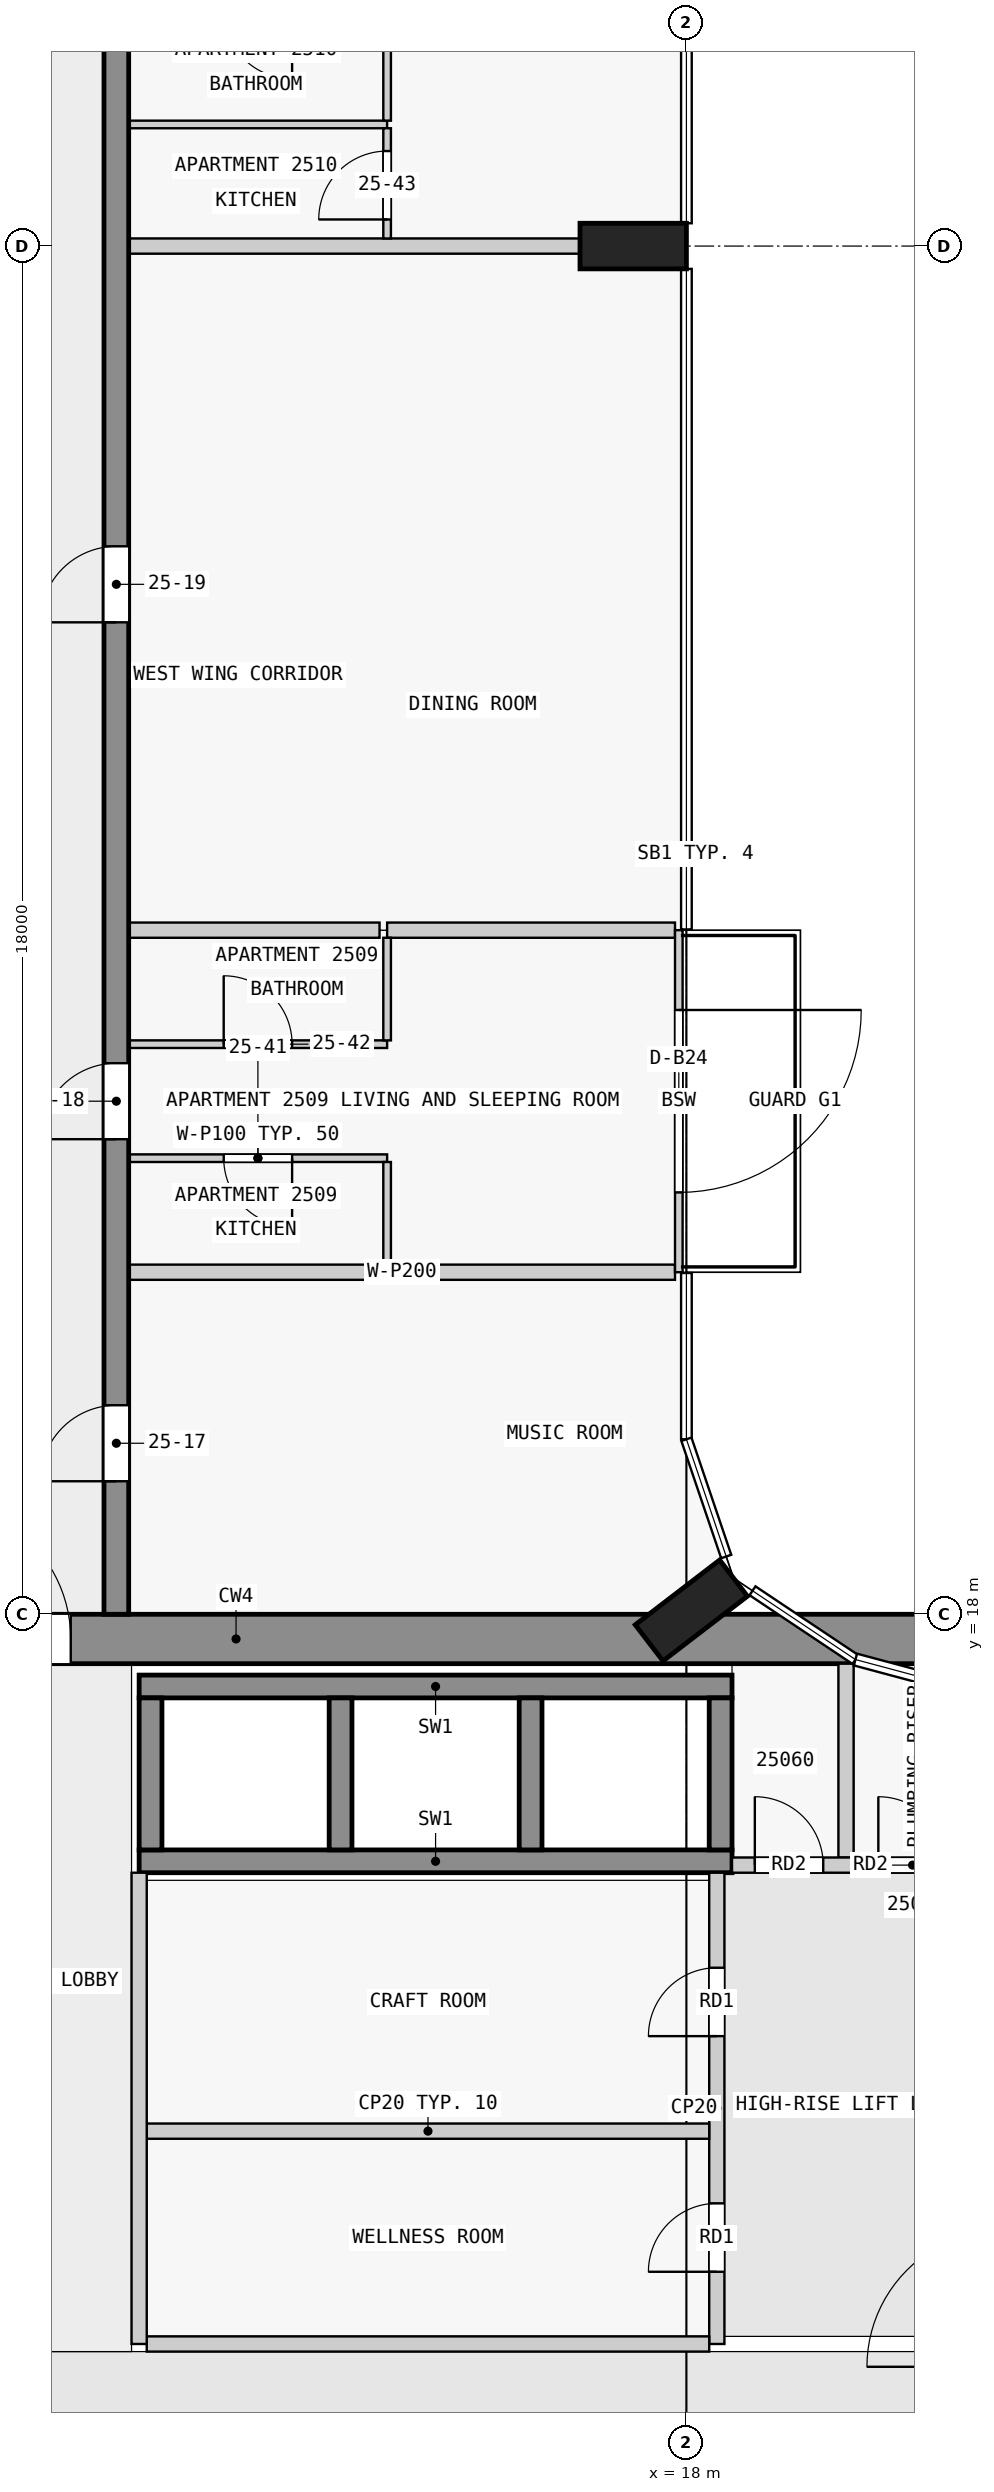
"""IFC4 building model, lengths in metres.
Left out: names, types, materials, properties, quantities, classifications, styles, units other than length and angle.
Written with IfcOpenShell. Run it as: python <this file> out.ifc"""

import sys

from ifc_helpers import new_model, si_unit, direction, frame, frame_2d, origin, origin_2d, place, context, subcontext, project, spatial, rectangle, extrude, element, fill, save


model = new_model("IFC4")
c1 = context("Model", 3, precision=1e-05, world=origin(), true_north=direction((0.0, 1.0)))
c2 = subcontext(c1, "Body", "Model", "MODEL_VIEW")
j1 = project(units=[si_unit("LENGTHUNIT", "METRE"), si_unit("PLANEANGLEUNIT", "RADIAN")], contexts=[c1])
p1 = place(None, origin())
s1 = spatial("IfcSite", under=j1, at=p1, CompositionType="ELEMENT")
p2 = place(p1, origin())
s2 = spatial("IfcBuilding", under=s1, at=p2, CompositionType="ELEMENT")
p3 = place(p2, frame((0.0, 0.0, 99.3)))
s3 = spatial("IfcBuildingStorey", under=s2, at=p3, CompositionType="ELEMENT", Elevation=99.3)
for number, where, z_axis, x_axis in (
    (1, (18.065, 18.05, 0.0), (0.0, 0.0, 1.0), (-0.609, 0.793, 0.0)),
    (2, (17.3, 36.0, 0.0), (0.0, 0.0, 1.0), (0.0, 1.0, 0.0)),
):
    element("IfcColumn", number, at=place(p3, frame(where, z_axis=z_axis, x_axis=x_axis)), inside=s3, PredefinedType="COLUMN", context=c2, shape_type="SweptSolid", body=[
        extrude(rectangle(XDim=0.6, YDim=1.4, at=origin_2d()), origin(), (0.0, 0.0, 1.0), 3.5),
    ])
p4 = place(p3, frame((1.65, 17.675, 0.0), z_axis=(0.0, 0.0, 1.0), x_axis=(1.0, 0.0, 0.0)))
e3 = element("IfcWall", 3, at=p4, inside=s3, PredefinedType="SHEAR", context=c2, shape_type="SweptSolid", body=[
    extrude(rectangle(XDim=20.85, YDim=0.65, at=frame_2d((10.425, 0.0))), origin(), (0.0, 0.0, 1.0), 3.25),
])
p5 = place(p4, frame((6.45, 0.0, 0.0)))
e4 = element("IfcOpeningElement", 4, at=p5, cuts=e3, PredefinedType="OPENING", context=c2, shape_type="SweptSolid", body=[
    extrude(rectangle(XDim=1.8, YDim=2.1, at=frame_2d((0.9, 1.05))), frame((0.0, 0.335, 0.0), z_axis=(0.0, -1.0, 0.0), x_axis=(1.0, 0.0, 0.0)), (0.0, 0.0, 1.0), 0.67),
])
for number, where, z_axis, x_axis in (
    (5, (10.8, 17.05, 0.0), (0.0, 0.0, 1.0), (1.0, 0.0, 0.0)),
    (6, (10.8, 14.75, 0.0), (0.0, 0.0, 1.0), (1.0, 0.0, 0.0)),
):
    element("IfcWall", number, at=place(p3, frame(where, z_axis=z_axis, x_axis=x_axis)), inside=s3, PredefinedType="SHEAR", context=c2, shape_type="SweptSolid", body=[
        extrude(rectangle(XDim=7.8, YDim=0.3, at=frame_2d((3.9, 0.0))), origin(), (0.0, 0.0, 1.0), 3.25),
    ])
for number, where, z_axis, x_axis in (
    (7, (10.95, 14.9, 0.0), (0.0, 0.0, 1.0), (0.0, 1.0, 0.0)),
    (8, (13.45, 14.9, 0.0), (0.0, 0.0, 1.0), (0.0, 1.0, 0.0)),
    (9, (15.95, 14.9, 0.0), (0.0, 0.0, 1.0), (0.0, 1.0, 0.0)),
    (10, (18.45, 14.9, 0.0), (0.0, 0.0, 1.0), (0.0, 1.0, 0.0)),
):
    element("IfcWall", number, at=place(p3, frame(where, z_axis=z_axis, x_axis=x_axis)), inside=s3, PredefinedType="SHEAR", context=c2, shape_type="SweptSolid", body=[
        extrude(rectangle(XDim=2.0, YDim=0.3, at=frame_2d((1.0, 0.0))), origin(), (0.0, 0.0, 1.0), 3.25),
    ])
p6 = place(p3, frame((10.5, 18.0, 0.0), z_axis=(0.0, 0.0, 1.0), x_axis=(0.0, 1.0, 0.0)))
e11 = element("IfcWall", 11, at=p6, inside=s3, PredefinedType="SHEAR", context=c2, shape_type="SweptSolid", body=[
    extrude(rectangle(XDim=27.0, YDim=0.325, at=frame_2d((13.5, 0.0))), origin(), (0.0, 0.0, 1.0), 3.25),
])
p7 = place(p6, frame((1.75, 0.0, 0.0)))
e12 = element("IfcOpeningElement", 12, at=p7, cuts=e11, PredefinedType="OPENING", context=c2, shape_type="SweptSolid", body=[
    extrude(rectangle(XDim=1.0, YDim=2.1, at=frame_2d((0.5, 1.05))), frame((0.0, 0.172, 0.0), z_axis=(0.0, -1.0, 0.0), x_axis=(1.0, 0.0, 0.0)), (0.0, 0.0, 1.0), 0.345),
])
p8 = place(p6, frame((6.25, 0.0, 0.0)))
e13 = element("IfcOpeningElement", 13, at=p8, cuts=e11, PredefinedType="OPENING", context=c2, shape_type="SweptSolid", body=[
    extrude(rectangle(XDim=1.0, YDim=2.1, at=frame_2d((0.5, 1.05))), frame((0.0, 0.172, 0.0), z_axis=(0.0, -1.0, 0.0), x_axis=(1.0, 0.0, 0.0)), (0.0, 0.0, 1.0), 0.345),
])
p9 = place(p6, frame((13.05, 0.0, 0.0)))
e14 = element("IfcOpeningElement", 14, at=p9, cuts=e11, PredefinedType="OPENING", context=c2, shape_type="SweptSolid", body=[
    extrude(rectangle(XDim=1.0, YDim=2.1, at=frame_2d((0.5, 1.05))), frame((0.0, 0.172, 0.0), z_axis=(0.0, -1.0, 0.0), x_axis=(1.0, 0.0, 0.0)), (0.0, 0.0, 1.0), 0.345),
])
p10 = place(p6, frame((21.35, 0.0, 0.0)))
e15 = element("IfcOpeningElement", 15, at=p10, cuts=e11, PredefinedType="OPENING", context=c2, shape_type="SweptSolid", body=[
    extrude(rectangle(XDim=1.0, YDim=2.1, at=frame_2d((0.5, 1.05))), frame((0.0, 0.172, 0.0), z_axis=(0.0, -1.0, 0.0), x_axis=(1.0, 0.0, 0.0)), (0.0, 0.0, 1.0), 0.345),
])
p11 = place(p3, frame((17.9, 27.0, 0.0), z_axis=(0.0, 0.0, 1.0), x_axis=(0.0, -1.0, 0.0)))
e16 = element("IfcWall", 16, at=p11, inside=s3, PredefinedType="STANDARD", context=c2, shape_type="SweptSolid", body=[
    extrude(rectangle(XDim=4.5, YDim=0.1, at=frame_2d((2.25, 0.0))), origin(), (0.0, 0.0, 1.0), 3.25),
])
p12 = place(p11, frame((1.05, 0.0, 0.0)))
e17 = element("IfcOpeningElement", 17, at=p12, cuts=e16, PredefinedType="OPENING", context=c2, shape_type="SweptSolid", body=[
    extrude(rectangle(XDim=2.4, YDim=2.4, at=frame_2d((1.2, 1.2))), frame((0.0, 0.06, 0.0), z_axis=(0.0, -1.0, 0.0), x_axis=(1.0, 0.0, 0.0)), (0.0, 0.0, 1.0), 0.12),
])
p13 = place(p3, frame((10.8, 8.4, 0.0), z_axis=(0.0, 0.0, 1.0), x_axis=(0.0, 1.0, 0.0)))
e18 = element("IfcWall", 18, at=p13, inside=s3, PredefinedType="PARTITIONING", context=c2, shape_type="SweptSolid", body=[
    extrude(rectangle(XDim=6.2, YDim=0.2, at=frame_2d((3.1, 0.0))), origin(), (0.0, 0.0, 1.0), 3.25),
])
p14 = place(p3, frame((10.9, 8.4, 0.0), z_axis=(0.0, 0.0, 1.0), x_axis=(1.0, 0.0, 0.0)))
e19 = element("IfcWall", 19, at=p14, inside=s3, PredefinedType="PARTITIONING", context=c2, shape_type="SweptSolid", body=[
    extrude(rectangle(XDim=7.4, YDim=0.2, at=frame_2d((3.7, 0.0))), origin(), (0.0, 0.0, 1.0), 3.25),
])
p15 = place(p3, frame((18.4, 8.4, 0.0), z_axis=(0.0, 0.0, 1.0), x_axis=(0.0, 1.0, 0.0)))
e20 = element("IfcWall", 20, at=p15, inside=s3, PredefinedType="PARTITIONING", context=c2, shape_type="SweptSolid", body=[
    extrude(rectangle(XDim=6.2, YDim=0.2, at=frame_2d((3.1, 0.0))), origin(), (0.0, 0.0, 1.0), 3.25),
])
p16 = place(p15, frame((0.95, 0.0, 0.0)))
e21 = element("IfcOpeningElement", 21, at=p16, cuts=e20, PredefinedType="OPENING", context=c2, shape_type="SweptSolid", body=[
    extrude(rectangle(XDim=0.9, YDim=2.1, at=frame_2d((0.45, 1.05))), frame((0.0, 0.11, 0.0), z_axis=(0.0, -1.0, 0.0), x_axis=(1.0, 0.0, 0.0)), (0.0, 0.0, 1.0), 0.22),
])
p17 = place(p15, frame((4.05, 0.0, 0.0)))
e22 = element("IfcOpeningElement", 22, at=p17, cuts=e20, PredefinedType="OPENING", context=c2, shape_type="SweptSolid", body=[
    extrude(rectangle(XDim=0.9, YDim=2.1, at=frame_2d((0.45, 1.05))), frame((0.0, 0.11, 0.0), z_axis=(0.0, -1.0, 0.0), x_axis=(1.0, 0.0, 0.0)), (0.0, 0.0, 1.0), 0.22),
])
p18 = place(p3, frame((10.9, 11.2, 0.0), z_axis=(0.0, 0.0, 1.0), x_axis=(1.0, 0.0, 0.0)))
e23 = element("IfcWall", 23, at=p18, inside=s3, PredefinedType="PARTITIONING", context=c2, shape_type="SweptSolid", body=[
    extrude(rectangle(XDim=7.4, YDim=0.2, at=frame_2d((3.7, 0.0))), origin(), (0.0, 0.0, 1.0), 3.25),
])
p19 = place(p3, frame((18.6, 14.7, 0.0), z_axis=(0.0, 0.0, 1.0), x_axis=(1.0, 0.0, 0.0)))
e24 = element("IfcWall", 24, at=p19, inside=s3, PredefinedType="PARTITIONING", context=c2, shape_type="SweptSolid", body=[
    extrude(rectangle(XDim=3.25, YDim=0.2, at=frame_2d((1.625, 0.0))), origin(), (0.0, 0.0, 1.0), 3.25),
])
p20 = place(p19, frame((0.3, 0.0, 0.0)))
e25 = element("IfcOpeningElement", 25, at=p20, cuts=e24, PredefinedType="OPENING", context=c2, shape_type="SweptSolid", body=[
    extrude(rectangle(XDim=0.9, YDim=2.1, at=frame_2d((0.45, 1.05))), frame((0.0, 0.11, 0.0), z_axis=(0.0, -1.0, 0.0), x_axis=(1.0, 0.0, 0.0)), (0.0, 0.0, 1.0), 0.22),
])
p21 = place(p19, frame((1.925, 0.0, 0.0)))
e26 = element("IfcOpeningElement", 26, at=p21, cuts=e24, PredefinedType="OPENING", context=c2, shape_type="SweptSolid", body=[
    extrude(rectangle(XDim=0.9, YDim=2.1, at=frame_2d((0.45, 1.05))), frame((0.0, 0.11, 0.0), z_axis=(0.0, -1.0, 0.0), x_axis=(1.0, 0.0, 0.0)), (0.0, 0.0, 1.0), 0.22),
])
p22 = place(p3, frame((20.1, 14.8, 0.0), z_axis=(0.0, 0.0, 1.0), x_axis=(0.0, 1.0, 0.0)))
e27 = element("IfcWall", 27, at=p22, inside=s3, PredefinedType="PARTITIONING", context=c2, shape_type="SweptSolid", body=[
    extrude(rectangle(XDim=2.55, YDim=0.2, at=frame_2d((1.275, 0.0))), origin(), (0.0, 0.0, 1.0), 3.25),
])
p23 = place(p3, frame((17.85, 22.5, 0.0), z_axis=(0.0, 0.0, 1.0), x_axis=(-1.0, 0.0, 0.0)))
e28 = element("IfcWall", 28, at=p23, inside=s3, PredefinedType="PARTITIONING", context=c2, shape_type="SweptSolid", body=[
    extrude(rectangle(XDim=7.188, YDim=0.2, at=frame_2d((3.594, 0.0))), origin(), (0.0, 0.0, 1.0), 3.25),
])
p24 = place(p3, frame((14.062, 24.0, 0.0), z_axis=(0.0, 0.0, 1.0), x_axis=(-1.0, 0.0, 0.0)))
e29 = element("IfcWall", 29, at=p24, inside=s3, PredefinedType="PARTITIONING", context=c2, shape_type="SweptSolid", body=[
    extrude(rectangle(XDim=3.4, YDim=0.1, at=frame_2d((1.7, 0.0))), origin(), (0.0, 0.0, 1.0), 3.25),
])
p25 = place(p24, frame((1.25, 0.0, 0.0)))
e30 = element("IfcOpeningElement", 30, at=p25, cuts=e29, PredefinedType="OPENING", context=c2, shape_type="SweptSolid", body=[
    extrude(rectangle(XDim=0.9, YDim=2.1, at=frame_2d((0.45, 1.05))), frame((0.0, 0.06, 0.0), z_axis=(0.0, -1.0, 0.0), x_axis=(1.0, 0.0, 0.0)), (0.0, 0.0, 1.0), 0.12),
])
p26 = place(p3, frame((10.663, 25.5, 0.0), z_axis=(0.0, 0.0, 1.0), x_axis=(1.0, 0.0, 0.0)))
e31 = element("IfcWall", 31, at=p26, inside=s3, PredefinedType="PARTITIONING", context=c2, shape_type="SweptSolid", body=[
    extrude(rectangle(XDim=3.4, YDim=0.1, at=frame_2d((1.7, 0.0))), origin(), (0.0, 0.0, 1.0), 3.25),
])
p27 = place(p26, frame((1.25, 0.0, 0.0)))
e32 = element("IfcOpeningElement", 32, at=p27, cuts=e31, PredefinedType="OPENING", context=c2, shape_type="SweptSolid", body=[
    extrude(rectangle(XDim=0.9, YDim=2.1, at=frame_2d((0.45, 1.05))), frame((0.0, 0.06, 0.0), z_axis=(0.0, -1.0, 0.0), x_axis=(1.0, 0.0, 0.0)), (0.0, 0.0, 1.0), 0.12),
])
p28 = place(p3, frame((13.962, 27.0, 0.0), z_axis=(0.0, 0.0, 1.0), x_axis=(-1.0, 0.0, 0.0)))
e33 = element("IfcWall", 33, at=p28, inside=s3, PredefinedType="PARTITIONING", context=c2, shape_type="SweptSolid", body=[
    extrude(rectangle(XDim=3.3, YDim=0.2, at=frame_2d((1.65, 0.0))), origin(), (0.0, 0.0, 1.0), 3.25),
])
p29 = place(p3, frame((14.062, 27.0, 0.0), z_axis=(0.0, 0.0, 1.0), x_axis=(1.0, 0.0, 0.0)))
e34 = element("IfcWall", 34, at=p29, inside=s3, PredefinedType="PARTITIONING", context=c2, shape_type="SweptSolid", body=[
    extrude(rectangle(XDim=3.788, YDim=0.2, at=frame_2d((1.894, 0.0))), origin(), (0.0, 0.0, 1.0), 3.25),
])
p30 = place(p3, frame((16.6, 36.0, 0.0), z_axis=(0.0, 0.0, 1.0), x_axis=(-1.0, 0.0, 0.0)))
e35 = element("IfcWall", 35, at=p30, inside=s3, PredefinedType="PARTITIONING", context=c2, shape_type="SweptSolid", body=[
    extrude(rectangle(XDim=5.938, YDim=0.2, at=frame_2d((2.969, 0.0))), origin(), (0.0, 0.0, 1.0), 3.25),
])
p31 = place(p3, frame((14.062, 37.6, 0.0), z_axis=(0.0, 0.0, 1.0), x_axis=(-1.0, 0.0, 0.0)))
e36 = element("IfcWall", 36, at=p31, inside=s3, PredefinedType="PARTITIONING", context=c2, shape_type="SweptSolid", body=[
    extrude(rectangle(XDim=3.4, YDim=0.1, at=frame_2d((1.7, 0.0))), origin(), (0.0, 0.0, 1.0), 3.25),
])
for number, where, z_axis, x_axis in (
    (37, (14.062, 22.6, 0.0), (0.0, 0.0, 1.0), (0.0, 1.0, 0.0)),
    (38, (14.062, 25.55, 0.0), (0.0, 0.0, 1.0), (0.0, 1.0, 0.0)),
):
    element("IfcWall", number, at=place(p3, frame(where, z_axis=z_axis, x_axis=x_axis)), inside=s3, PredefinedType="PARTITIONING", context=c2, shape_type="SweptSolid", body=[
        extrude(rectangle(XDim=1.35, YDim=0.1, at=frame_2d((0.675, 0.0))), origin(), (0.0, 0.0, 1.0), 3.25),
    ])
p32 = place(p3, frame((14.062, 36.1, 0.0), z_axis=(0.0, 0.0, 1.0), x_axis=(0.0, 1.0, 0.0)))
e39 = element("IfcWall", 39, at=p32, inside=s3, PredefinedType="PARTITIONING", context=c2, shape_type="SweptSolid", body=[
    extrude(rectangle(XDim=1.45, YDim=0.1, at=frame_2d((0.725, 0.0))), origin(), (0.0, 0.0, 1.0), 3.25),
])
p33 = place(p32, frame((0.25, 0.0, 0.0)))
e40 = element("IfcOpeningElement", 40, at=p33, cuts=e39, PredefinedType="OPENING", context=c2, shape_type="SweptSolid", body=[
    extrude(rectangle(XDim=0.9, YDim=2.1, at=frame_2d((0.45, 1.05))), frame((0.0, 0.06, 0.0), z_axis=(0.0, -1.0, 0.0), x_axis=(1.0, 0.0, 0.0)), (0.0, 0.0, 1.0), 0.12),
])
p34 = place(p3, frame((14.062, 37.65, 0.0), z_axis=(0.0, 0.0, 1.0), x_axis=(0.0, 1.0, 0.0)))
e41 = element("IfcWall", 41, at=p34, inside=s3, PredefinedType="PARTITIONING", context=c2, shape_type="SweptSolid", body=[
    extrude(rectangle(XDim=1.4, YDim=0.1, at=frame_2d((0.7, 0.0))), origin(), (0.0, 0.0, 1.0), 3.25),
])
p35 = place(p12, origin())
e42 = element("IfcDoor", 42, at=p35, inside=s3, OperationType="SINGLE_SWING_LEFT", PredefinedType="DOOR", context=c2, shape_type="SweptSolid", body=[
    extrude(rectangle(XDim=2.4, YDim=2.4, at=frame_2d((1.2, 1.2))), frame((0.0, 0.025, 0.0), z_axis=(0.0, -1.0, 0.0), x_axis=(1.0, 0.0, 0.0)), (0.0, 0.0, 1.0), 0.05),
])
fill(e17, e42)
p36 = place(p16, origin())
e43 = element("IfcDoor", 43, at=p36, inside=s3, OperationType="SINGLE_SWING_LEFT", PredefinedType="DOOR", context=c2, shape_type="SweptSolid", body=[
    extrude(rectangle(XDim=0.9, YDim=2.1, at=frame_2d((0.45, 1.05))), frame((0.0, 0.025, 0.0), z_axis=(0.0, -1.0, 0.0), x_axis=(1.0, 0.0, 0.0)), (0.0, 0.0, 1.0), 0.05),
])
fill(e21, e43)
p37 = place(p17, origin())
e44 = element("IfcDoor", 44, at=p37, inside=s3, OperationType="SINGLE_SWING_LEFT", PredefinedType="DOOR", context=c2, shape_type="SweptSolid", body=[
    extrude(rectangle(XDim=0.9, YDim=2.1, at=frame_2d((0.45, 1.05))), frame((0.0, 0.025, 0.0), z_axis=(0.0, -1.0, 0.0), x_axis=(1.0, 0.0, 0.0)), (0.0, 0.0, 1.0), 0.05),
])
fill(e22, e44)
p38 = place(p5, origin())
e45 = element("IfcDoor", 45, at=p38, inside=s3, OperationType="DOUBLE_DOOR_SINGLE_SWING", PredefinedType="DOOR", context=c2, shape_type="SweptSolid", body=[
    extrude(rectangle(XDim=1.8, YDim=2.1, at=frame_2d((0.9, 1.05))), frame((0.0, 0.025, 0.0), z_axis=(0.0, -1.0, 0.0), x_axis=(1.0, 0.0, 0.0)), (0.0, 0.0, 1.0), 0.05),
])
fill(e4, e45)
p39 = place(p20, origin())
e46 = element("IfcDoor", 46, at=p39, inside=s3, OperationType="SINGLE_SWING_LEFT", PredefinedType="DOOR", context=c2, shape_type="SweptSolid", body=[
    extrude(rectangle(XDim=0.9, YDim=2.1, at=frame_2d((0.45, 1.05))), frame((0.0, 0.025, 0.0), z_axis=(0.0, -1.0, 0.0), x_axis=(1.0, 0.0, 0.0)), (0.0, 0.0, 1.0), 0.05),
])
fill(e25, e46)
p40 = place(p21, origin())
e47 = element("IfcDoor", 47, at=p40, inside=s3, OperationType="SINGLE_SWING_LEFT", PredefinedType="DOOR", context=c2, shape_type="SweptSolid", body=[
    extrude(rectangle(XDim=0.9, YDim=2.1, at=frame_2d((0.45, 1.05))), frame((0.0, 0.025, 0.0), z_axis=(0.0, -1.0, 0.0), x_axis=(1.0, 0.0, 0.0)), (0.0, 0.0, 1.0), 0.05),
])
fill(e26, e47)
p41 = place(p7, origin())
e48 = element("IfcDoor", 48, at=p41, inside=s3, OperationType="SINGLE_SWING_LEFT", PredefinedType="DOOR", context=c2, shape_type="SweptSolid", body=[
    extrude(rectangle(XDim=1.0, YDim=2.1, at=frame_2d((0.5, 1.05))), frame((0.0, 0.025, 0.0), z_axis=(0.0, -1.0, 0.0), x_axis=(1.0, 0.0, 0.0)), (0.0, 0.0, 1.0), 0.05),
])
fill(e12, e48)
p42 = place(p8, origin())
e49 = element("IfcDoor", 49, at=p42, inside=s3, OperationType="SINGLE_SWING_LEFT", PredefinedType="DOOR", context=c2, shape_type="SweptSolid", body=[
    extrude(rectangle(XDim=1.0, YDim=2.1, at=frame_2d((0.5, 1.05))), frame((0.0, 0.025, 0.0), z_axis=(0.0, -1.0, 0.0), x_axis=(1.0, 0.0, 0.0)), (0.0, 0.0, 1.0), 0.05),
])
fill(e13, e49)
p43 = place(p9, origin())
e50 = element("IfcDoor", 50, at=p43, inside=s3, OperationType="SINGLE_SWING_RIGHT", PredefinedType="DOOR", context=c2, shape_type="SweptSolid", body=[
    extrude(rectangle(XDim=1.0, YDim=2.1, at=frame_2d((0.5, 1.05))), frame((0.0, 0.025, 0.0), z_axis=(0.0, -1.0, 0.0), x_axis=(1.0, 0.0, 0.0)), (0.0, 0.0, 1.0), 0.05),
])
fill(e14, e50)
p44 = place(p25, origin())
e51 = element("IfcDoor", 51, at=p44, inside=s3, OperationType="SINGLE_SWING_LEFT", PredefinedType="DOOR", context=c2, shape_type="SweptSolid", body=[
    extrude(rectangle(XDim=0.9, YDim=2.1, at=frame_2d((0.45, 1.05))), frame((0.0, 0.025, 0.0), z_axis=(0.0, -1.0, 0.0), x_axis=(1.0, 0.0, 0.0)), (0.0, 0.0, 1.0), 0.05),
])
fill(e30, e51)
p45 = place(p27, origin())
e52 = element("IfcDoor", 52, at=p45, inside=s3, OperationType="SINGLE_SWING_LEFT", PredefinedType="DOOR", context=c2, shape_type="SweptSolid", body=[
    extrude(rectangle(XDim=0.9, YDim=2.1, at=frame_2d((0.45, 1.05))), frame((0.0, 0.025, 0.0), z_axis=(0.0, -1.0, 0.0), x_axis=(1.0, 0.0, 0.0)), (0.0, 0.0, 1.0), 0.05),
])
fill(e32, e52)
p46 = place(p33, origin())
e53 = element("IfcDoor", 53, at=p46, inside=s3, OperationType="SINGLE_SWING_LEFT", PredefinedType="DOOR", context=c2, shape_type="SweptSolid", body=[
    extrude(rectangle(XDim=0.9, YDim=2.1, at=frame_2d((0.45, 1.05))), frame((0.0, 0.025, 0.0), z_axis=(0.0, -1.0, 0.0), x_axis=(1.0, 0.0, 0.0)), (0.0, 0.0, 1.0), 0.05),
])
fill(e40, e53)
save(model, sys.argv[1])
